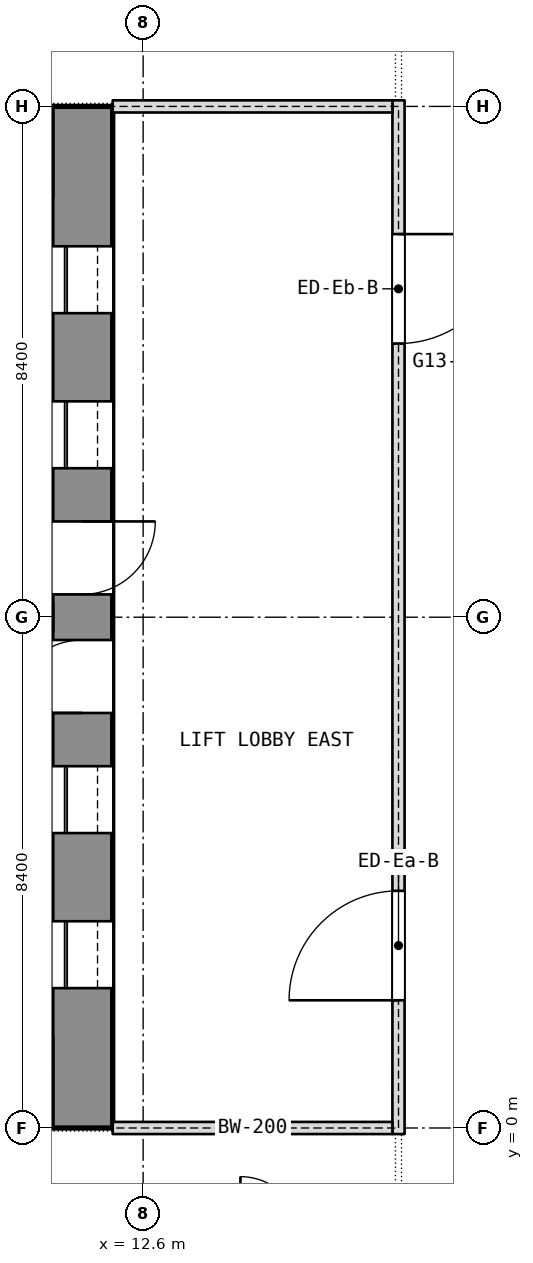
"""IFC4 building model, lengths in metres.
Left out: names, types, materials, properties, quantities, classifications, styles, units other than length and angle.
Written with IfcOpenShell. Run it as: python <this file> out.ifc"""

import sys

from ifc_helpers import new_model, si_unit, direction, frame, frame_2d, origin, place, context, subcontext, project, spatial, rectangle, extrude, element, fill, save


model = new_model("IFC4")
c1 = context("Model", 3, precision=1e-05, world=origin(), true_north=direction((0.0, 1.0)))
c2 = subcontext(c1, "Body", "Model", "MODEL_VIEW")
j1 = project(units=[si_unit("LENGTHUNIT", "METRE"), si_unit("PLANEANGLEUNIT", "RADIAN")], contexts=[c1])
p1 = place(None, origin())
s1 = spatial("IfcSite", under=j1, at=p1, CompositionType="ELEMENT")
p2 = place(p1, origin())
s2 = spatial("IfcBuilding", under=s1, at=p2, CompositionType="ELEMENT")
p3 = place(p2, frame((0.0, 0.0, 151.7)))
s3 = spatial("IfcBuildingStorey", under=s2, at=p3, CompositionType="ELEMENT", Elevation=151.7)
p4 = place(p3, frame((11.6, 0.0, 0.0), z_axis=(0.0, 0.0, 1.0), x_axis=(0.0, 1.0, 0.0)))
e1 = element("IfcWall", 1, at=p4, inside=s3, PredefinedType="SHEAR", context=c2, shape_type="SweptSolid", body=[
    extrude(rectangle(XDim=16.8, YDim=1.0, at=frame_2d((8.4, 0.0))), origin(), (0.0, 0.0, 1.0), 3.6),
])
p5 = place(p4, frame((2.3, 0.0, 0.0)))
e2 = element("IfcOpeningElement", 2, at=p5, cuts=e1, PredefinedType="OPENING", context=c2, shape_type="SweptSolid", body=[
    extrude(rectangle(XDim=1.1, YDim=2.1, at=frame_2d((0.55, 1.05))), frame((0.0, 0.5, 0.0), z_axis=(0.0, -1.0, 0.0), x_axis=(1.0, 0.0, 0.0)), (0.0, 0.0, 1.0), 1.0),
])
p6 = place(p4, frame((4.85, 0.0, 0.0)))
e3 = element("IfcOpeningElement", 3, at=p6, cuts=e1, PredefinedType="OPENING", context=c2, shape_type="SweptSolid", body=[
    extrude(rectangle(XDim=1.1, YDim=2.1, at=frame_2d((0.55, 1.05))), frame((0.0, 0.5, 0.0), z_axis=(0.0, -1.0, 0.0), x_axis=(1.0, 0.0, 0.0)), (0.0, 0.0, 1.0), 1.0),
])
p7 = place(p4, frame((6.825, 0.0, 0.0)))
e4 = element("IfcOpeningElement", 4, at=p7, cuts=e1, PredefinedType="OPENING", context=c2, shape_type="SweptSolid", body=[
    extrude(rectangle(XDim=1.2, YDim=2.1, at=frame_2d((0.6, 1.05))), frame((0.0, 0.5, 0.0), z_axis=(0.0, -1.0, 0.0), x_axis=(1.0, 0.0, 0.0)), (0.0, 0.0, 1.0), 1.0),
])
p8 = place(p4, frame((13.4, 0.0, 0.0)))
e5 = element("IfcOpeningElement", 5, at=p8, cuts=e1, PredefinedType="OPENING", context=c2, shape_type="SweptSolid", body=[
    extrude(rectangle(XDim=1.1, YDim=2.1, at=frame_2d((0.55, 1.05))), frame((0.0, 0.5, 0.0), z_axis=(0.0, -1.0, 0.0), x_axis=(1.0, 0.0, 0.0)), (0.0, 0.0, 1.0), 1.0),
])
p9 = place(p4, frame((10.85, 0.0, 0.0)))
e6 = element("IfcOpeningElement", 6, at=p9, cuts=e1, PredefinedType="OPENING", context=c2, shape_type="SweptSolid", body=[
    extrude(rectangle(XDim=1.1, YDim=2.1, at=frame_2d((0.55, 1.05))), frame((0.0, 0.5, 0.0), z_axis=(0.0, -1.0, 0.0), x_axis=(1.0, 0.0, 0.0)), (0.0, 0.0, 1.0), 1.0),
])
p10 = place(p4, frame((8.775, 0.0, 0.0)))
e7 = element("IfcOpeningElement", 7, at=p10, cuts=e1, PredefinedType="OPENING", context=c2, shape_type="SweptSolid", body=[
    extrude(rectangle(XDim=1.2, YDim=2.1, at=frame_2d((0.6, 1.05))), frame((0.0, 0.5, 0.0), z_axis=(0.0, -1.0, 0.0), x_axis=(1.0, 0.0, 0.0)), (0.0, 0.0, 1.0), 1.0),
])
p11 = place(p3, frame((16.8, -0.1, 0.0), z_axis=(0.0, 0.0, 1.0), x_axis=(0.0, 1.0, 0.0)))
e8 = element("IfcWall", 8, at=p11, inside=s3, PredefinedType="PARTITIONING", context=c2, shape_type="SweptSolid", body=[
    extrude(rectangle(XDim=17.0, YDim=0.2, at=frame_2d((8.5, 0.0))), origin(), (0.0, 0.0, 1.0), 3.34),
])
p12 = place(p11, frame((2.2, 0.0, 0.0)))
e9 = element("IfcOpeningElement", 9, at=p12, cuts=e8, PredefinedType="OPENING", context=c2, shape_type="SweptSolid", body=[
    extrude(rectangle(XDim=1.8, YDim=2.1, at=frame_2d((0.9, 1.05))), frame((0.0, 0.1, 0.0), z_axis=(0.0, -1.0, 0.0), x_axis=(1.0, 0.0, 0.0)), (0.0, 0.0, 1.0), 0.2),
])
p13 = place(p11, frame((13.0, 0.0, 0.0)))
e10 = element("IfcOpeningElement", 10, at=p13, cuts=e8, PredefinedType="OPENING", context=c2, shape_type="SweptSolid", body=[
    extrude(rectangle(XDim=1.8, YDim=2.1, at=frame_2d((0.9, 1.05))), frame((0.0, 0.1, 0.0), z_axis=(0.0, -1.0, 0.0), x_axis=(1.0, 0.0, 0.0)), (0.0, 0.0, 1.0), 0.2),
])
for number, where, z_axis, x_axis in (
    (11, (12.1, 0.0, 0.0), (0.0, 0.0, 1.0), (1.0, 0.0, 0.0)),
    (12, (12.1, 16.8, 0.0), (0.0, 0.0, 1.0), (1.0, 0.0, 0.0)),
):
    element("IfcWall", number, at=place(p3, frame(where, z_axis=z_axis, x_axis=x_axis)), inside=s3, PredefinedType="PARTITIONING", context=c2, shape_type="SweptSolid", body=[
        extrude(rectangle(XDim=4.6, YDim=0.2, at=frame_2d((2.3, 0.0))), origin(), (0.0, 0.0, 1.0), 2.89),
    ])
p14 = place(p5, origin())
e13 = element("IfcDoor", 13, at=p14, inside=s3, OperationType="SLIDING_TO_LEFT", PredefinedType="DOOR", context=c2, shape_type="SweptSolid", body=[
    extrude(rectangle(XDim=1.1, YDim=2.1, at=frame_2d((0.55, 1.05))), frame((0.0, 0.025, 0.0), z_axis=(0.0, -1.0, 0.0), x_axis=(1.0, 0.0, 0.0)), (0.0, 0.0, 1.0), 0.05),
])
fill(e2, e13)
p15 = place(p6, origin())
e14 = element("IfcDoor", 14, at=p15, inside=s3, OperationType="SLIDING_TO_LEFT", PredefinedType="DOOR", context=c2, shape_type="SweptSolid", body=[
    extrude(rectangle(XDim=1.1, YDim=2.1, at=frame_2d((0.55, 1.05))), frame((0.0, 0.025, 0.0), z_axis=(0.0, -1.0, 0.0), x_axis=(1.0, 0.0, 0.0)), (0.0, 0.0, 1.0), 0.05),
])
fill(e3, e14)
p16 = place(p7, origin())
e15 = element("IfcDoor", 15, at=p16, inside=s3, OperationType="SINGLE_SWING_LEFT", PredefinedType="DOOR", context=c2, shape_type="SweptSolid", body=[
    extrude(rectangle(XDim=1.2, YDim=2.1, at=frame_2d((0.6, 1.05))), frame((0.0, 0.025, 0.0), z_axis=(0.0, -1.0, 0.0), x_axis=(1.0, 0.0, 0.0)), (0.0, 0.0, 1.0), 0.05),
])
fill(e4, e15)
p17 = place(p8, origin())
e16 = element("IfcDoor", 16, at=p17, inside=s3, OperationType="SLIDING_TO_LEFT", PredefinedType="DOOR", context=c2, shape_type="SweptSolid", body=[
    extrude(rectangle(XDim=1.1, YDim=2.1, at=frame_2d((0.55, 1.05))), frame((0.0, 0.025, 0.0), z_axis=(0.0, -1.0, 0.0), x_axis=(1.0, 0.0, 0.0)), (0.0, 0.0, 1.0), 0.05),
])
fill(e5, e16)
p18 = place(p9, origin())
e17 = element("IfcDoor", 17, at=p18, inside=s3, OperationType="SLIDING_TO_LEFT", PredefinedType="DOOR", context=c2, shape_type="SweptSolid", body=[
    extrude(rectangle(XDim=1.1, YDim=2.1, at=frame_2d((0.55, 1.05))), frame((0.0, 0.025, 0.0), z_axis=(0.0, -1.0, 0.0), x_axis=(1.0, 0.0, 0.0)), (0.0, 0.0, 1.0), 0.05),
])
fill(e6, e17)
p19 = place(p10, origin())
e18 = element("IfcDoor", 18, at=p19, inside=s3, OperationType="SINGLE_SWING_LEFT", PredefinedType="DOOR", context=c2, shape_type="SweptSolid", body=[
    extrude(rectangle(XDim=1.2, YDim=2.1, at=frame_2d((0.6, 1.05))), frame((0.0, 0.025, 0.0), z_axis=(0.0, -1.0, 0.0), x_axis=(1.0, 0.0, 0.0)), (0.0, 0.0, 1.0), 0.05),
])
fill(e7, e18)
p20 = place(p12, origin())
e19 = element("IfcDoor", 19, at=p20, inside=s3, OperationType="DOUBLE_DOOR_SINGLE_SWING", PredefinedType="DOOR", context=c2, shape_type="SweptSolid", body=[
    extrude(rectangle(XDim=1.8, YDim=2.1, at=frame_2d((0.9, 1.05))), frame((0.0, 0.025, 0.0), z_axis=(0.0, -1.0, 0.0), x_axis=(1.0, 0.0, 0.0)), (0.0, 0.0, 1.0), 0.05),
])
fill(e9, e19)
p21 = place(p13, origin())
e20 = element("IfcDoor", 20, at=p21, inside=s3, OperationType="DOUBLE_DOOR_SINGLE_SWING", PredefinedType="DOOR", context=c2, shape_type="SweptSolid", body=[
    extrude(rectangle(XDim=1.8, YDim=2.1, at=frame_2d((0.9, 1.05))), frame((0.0, 0.025, 0.0), z_axis=(0.0, -1.0, 0.0), x_axis=(1.0, 0.0, 0.0)), (0.0, 0.0, 1.0), 0.05),
])
fill(e10, e20)
save(model, sys.argv[1])
